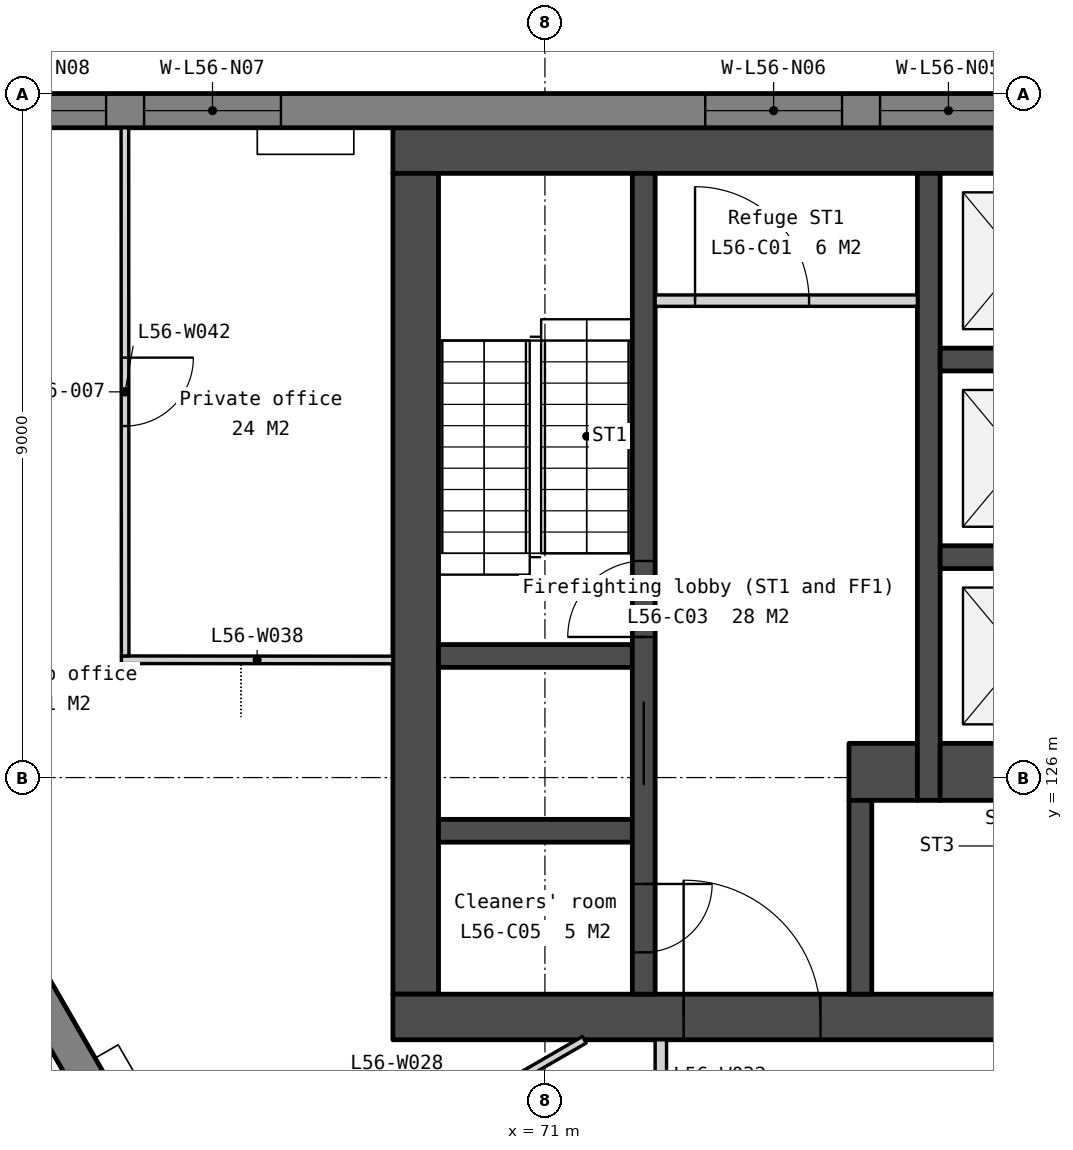
"""IFC4 building model, lengths in metres.
Left out: names, types, materials, properties, quantities, classifications, styles, units other than length and angle.
Written with IfcOpenShell. Run it as: python <this file> out.ifc"""

import sys

from ifc_helpers import new_model, si_unit, direction, frame, frame_2d, origin, place, context, subcontext, project, spatial, polyline, rectangle, outline, extrude, element, fill, save


model = new_model("IFC4")
c1 = context("Model", 3, precision=1e-05, world=origin(), true_north=direction((0.0, 1.0)))
c2 = subcontext(c1, "Body", "Model", "MODEL_VIEW")
j1 = project(units=[si_unit("LENGTHUNIT", "METRE"), si_unit("PLANEANGLEUNIT", "RADIAN")], contexts=[c1])
p1 = place(None, origin())
s1 = spatial("IfcSite", under=j1, at=p1, CompositionType="ELEMENT")
p2 = place(p1, origin())
s2 = spatial("IfcBuilding", under=s1, at=p2, CompositionType="ELEMENT")
p3 = place(p2, frame((0.0, 0.0, 223.1)))
s3 = spatial("IfcBuildingStorey", under=s2, at=p3, CompositionType="ELEMENT", Elevation=223.1)
p4 = place(p3, frame((69.0, 134.25, 0.0), z_axis=(0.0, 0.0, 1.0), x_axis=(1.0, 0.0, 0.0)))
e1 = element("IfcWall", 1, at=p4, inside=s3, PredefinedType="SOLIDWALL", context=c2, shape_type="SweptSolid", body=[
    extrude(rectangle(XDim=22.0, YDim=0.6, at=frame_2d((11.0, 0.0))), origin(), (0.0, 0.0, 1.0), 3.6),
])
p5 = place(p3, frame((69.3, 133.95, 0.0), z_axis=(0.0, 0.0, 1.0), x_axis=(0.0, -1.0, 0.0)))
e2 = element("IfcWall", 2, at=p5, inside=s3, PredefinedType="SOLIDWALL", context=c2, shape_type="SweptSolid", body=[
    extrude(rectangle(XDim=10.8, YDim=0.6, at=frame_2d((5.4, 0.0))), origin(), (0.0, 0.0, 1.0), 3.6),
])
p6 = place(p3, frame((69.0, 122.85, 0.0), z_axis=(0.0, 0.0, 1.0), x_axis=(1.0, 0.0, 0.0)))
e3 = element("IfcWall", 3, at=p6, inside=s3, PredefinedType="SOLIDWALL", context=c2, shape_type="SweptSolid", body=[
    extrude(rectangle(XDim=22.0, YDim=0.6, at=frame_2d((11.0, 0.0))), origin(), (0.0, 0.0, 1.0), 3.6),
])
p7 = place(p6, frame((16.375, 0.0, 0.0)))
e4 = element("IfcOpeningElement", 4, at=p7, cuts=e3, PredefinedType="OPENING", context=c2, shape_type="SweptSolid", body=[
    extrude(rectangle(XDim=1.8, YDim=2.1, at=frame_2d((0.9, 1.05))), frame((0.0, 0.31, 0.0), z_axis=(0.0, -1.0, 0.0), x_axis=(1.0, 0.0, 0.0)), (0.0, 0.0, 1.0), 0.62),
])
p8 = place(p6, frame((3.825, 0.0, 0.0)))
e5 = element("IfcOpeningElement", 5, at=p8, cuts=e3, PredefinedType="OPENING", context=c2, shape_type="SweptSolid", body=[
    extrude(rectangle(XDim=1.8, YDim=2.1, at=frame_2d((0.9, 1.05))), frame((0.0, 0.31, 0.0), z_axis=(0.0, -1.0, 0.0), x_axis=(1.0, 0.0, 0.0)), (0.0, 0.0, 1.0), 0.62),
])
p9 = place(p6, frame((12.85, 0.0, 0.0)))
e6 = element("IfcOpeningElement", 6, at=p9, cuts=e3, PredefinedType="OPENING", context=c2, shape_type="SweptSolid", body=[
    extrude(rectangle(XDim=1.5, YDim=2.1, at=frame_2d((0.75, 1.05))), frame((0.0, 0.31, 0.0), z_axis=(0.0, -1.0, 0.0), x_axis=(1.0, 0.0, 0.0)), (0.0, 0.0, 1.0), 0.62),
])
for number, where, z_axis, x_axis in (
    (7, (69.6, 127.6, 0.0), (0.0, 0.0, 1.0), (1.0, 0.0, 0.0)),
    (8, (69.6, 125.3, 0.0), (0.0, 0.0, 1.0), (1.0, 0.0, 0.0)),
):
    element("IfcWall", number, at=place(p3, frame(where, z_axis=z_axis, x_axis=x_axis)), inside=s3, PredefinedType="SOLIDWALL", context=c2, shape_type="SweptSolid", body=[
        extrude(rectangle(XDim=2.55, YDim=0.3, at=frame_2d((1.275, 0.0))), origin(), (0.0, 0.0, 1.0), 3.6),
    ])
p10 = place(p3, frame((72.3, 133.95, 0.0), z_axis=(0.0, 0.0, 1.0), x_axis=(0.0, -1.0, 0.0)))
e9 = element("IfcWall", 9, at=p10, inside=s3, PredefinedType="SOLIDWALL", context=c2, shape_type="SweptSolid", body=[
    extrude(rectangle(XDim=10.8, YDim=0.3, at=frame_2d((5.4, 0.0))), origin(), (0.0, 0.0, 1.0), 3.6),
])
p11 = place(p10, frame((6.95, 0.0, 0.0)))
e10 = element("IfcOpeningElement", 10, at=p11, cuts=e9, PredefinedType="OPENING", context=c2, shape_type="SweptSolid", body=[
    extrude(rectangle(XDim=1.1, YDim=2.1, at=frame_2d((0.55, 1.05))), frame((0.0, 0.16, 0.0), z_axis=(0.0, -1.0, 0.0), x_axis=(1.0, 0.0, 0.0)), (0.0, 0.0, 1.0), 0.32),
])
p12 = place(p10, frame((9.35, 0.0, 0.0)))
e11 = element("IfcOpeningElement", 11, at=p12, cuts=e9, PredefinedType="OPENING", context=c2, shape_type="SweptSolid", body=[
    extrude(rectangle(XDim=0.9, YDim=2.1, at=frame_2d((0.45, 1.05))), frame((0.0, 0.16, 0.0), z_axis=(0.0, -1.0, 0.0), x_axis=(1.0, 0.0, 0.0)), (0.0, 0.0, 1.0), 0.32),
])
p13 = place(p10, frame((5.1, 0.0, 0.0)))
e12 = element("IfcOpeningElement", 12, at=p13, cuts=e9, PredefinedType="OPENING", context=c2, shape_type="SweptSolid", body=[
    extrude(rectangle(XDim=1.0, YDim=2.1, at=frame_2d((0.5, 1.05))), frame((0.0, 0.16, 0.0), z_axis=(0.0, -1.0, 0.0), x_axis=(1.0, 0.0, 0.0)), (0.0, 0.0, 1.0), 0.32),
])
p14 = place(p3, frame((72.45, 132.275, 0.0), z_axis=(0.0, 0.0, 1.0), x_axis=(1.0, 0.0, 0.0)))
e13 = element("IfcWall", 13, at=p14, inside=s3, PredefinedType="PARTITIONING", context=c2, shape_type="SweptSolid", body=[
    extrude(rectangle(XDim=3.45, YDim=0.15, at=frame_2d((1.725, 0.0))), origin(), (0.0, 0.0, 1.0), 3.6),
])
p15 = place(p14, frame((0.525, 0.0, 0.0)))
e14 = element("IfcOpeningElement", 14, at=p15, cuts=e13, PredefinedType="OPENING", context=c2, shape_type="SweptSolid", body=[
    extrude(rectangle(XDim=1.5, YDim=2.1, at=frame_2d((0.75, 1.05))), frame((0.0, 0.085, 0.0), z_axis=(0.0, -1.0, 0.0), x_axis=(1.0, 0.0, 0.0)), (0.0, 0.0, 1.0), 0.17),
])
p16 = place(p3, frame((75.0, 126.075, 0.0), z_axis=(0.0, 0.0, 1.0), x_axis=(1.0, 0.0, 0.0)))
e15 = element("IfcWall", 15, at=p16, inside=s3, PredefinedType="SOLIDWALL", context=c2, shape_type="SweptSolid", body=[
    extrude(rectangle(XDim=0.9, YDim=0.75, at=frame_2d((0.45, 0.0))), origin(), (0.0, 0.0, 1.0), 3.6),
])
p17 = place(p3, frame((75.15, 125.7, 0.0), z_axis=(0.0, 0.0, 1.0), x_axis=(0.0, -1.0, 0.0)))
e16 = element("IfcWall", 16, at=p17, inside=s3, PredefinedType="SOLIDWALL", context=c2, shape_type="SweptSolid", body=[
    extrude(rectangle(XDim=2.55, YDim=0.3, at=frame_2d((1.275, 0.0))), origin(), (0.0, 0.0, 1.0), 3.6),
])
p18 = place(p3, frame((76.05, 133.95, 0.0), z_axis=(0.0, 0.0, 1.0), x_axis=(0.0, -1.0, 0.0)))
e17 = element("IfcWall", 17, at=p18, inside=s3, PredefinedType="SOLIDWALL", context=c2, shape_type="SweptSolid", body=[
    extrude(rectangle(XDim=8.25, YDim=0.3, at=frame_2d((4.125, 0.0))), origin(), (0.0, 0.0, 1.0), 3.6),
])
for number, where, z_axis, x_axis in (
    (18, (76.2, 131.5, 0.0), (0.0, 0.0, 1.0), (1.0, 0.0, 0.0)),
    (19, (76.2, 128.9, 0.0), (0.0, 0.0, 1.0), (1.0, 0.0, 0.0)),
):
    element("IfcWall", number, at=place(p3, frame(where, z_axis=z_axis, x_axis=x_axis)), inside=s3, PredefinedType="SOLIDWALL", context=c2, shape_type="SweptSolid", body=[
        extrude(rectangle(XDim=2.1, YDim=0.3, at=frame_2d((1.05, 0.0))), origin(), (0.0, 0.0, 1.0), 3.6),
    ])
p19 = place(p3, frame((76.2, 126.075, 0.0), z_axis=(0.0, 0.0, 1.0), x_axis=(1.0, 0.0, 0.0)))
e20 = element("IfcWall", 20, at=p19, inside=s3, PredefinedType="SOLIDWALL", context=c2, shape_type="SweptSolid", body=[
    extrude(rectangle(XDim=2.1, YDim=0.75, at=frame_2d((1.05, 0.0))), origin(), (0.0, 0.0, 1.0), 3.6),
])
p20 = place(p3, frame((99.365, 134.775, -0.15), z_axis=(0.0, 0.0, 1.0), x_axis=(-1.0, 0.0, 0.0)))
e21 = element("IfcWall", 21, at=p20, inside=s3, PredefinedType="SOLIDWALL", context=c2, shape_type="SweptSolid", body=[
    extrude(outline(polyline([(38.729, 0.0), (38.729, 3.75), (0.0, 3.75), (0.0, 0.0), (38.729, 0.0)])), frame((0.0, 0.225, 0.0), z_axis=(0.0, -1.0, 0.0), x_axis=(1.0, 0.0, 0.0)), (0.0, 0.0, 1.0), 0.45),
])
p21 = place(p20, frame((2.791, 0.0, 0.95)))
e22 = element("IfcOpeningElement", 22, at=p21, cuts=e21, PredefinedType="OPENING", context=c2, shape_type="SweptSolid", body=[
    extrude(rectangle(XDim=1.8, YDim=2.2, at=frame_2d((0.9, 1.1))), frame((0.0, 0.235, 0.0), z_axis=(0.0, -1.0, 0.0), x_axis=(1.0, 0.0, 0.0)), (0.0, 0.0, 1.0), 0.47),
])
p22 = place(p20, frame((5.091, 0.0, 0.95)))
e23 = element("IfcOpeningElement", 23, at=p22, cuts=e21, PredefinedType="OPENING", context=c2, shape_type="SweptSolid", body=[
    extrude(rectangle(XDim=1.8, YDim=2.2, at=frame_2d((0.9, 1.1))), frame((0.0, 0.235, 0.0), z_axis=(0.0, -1.0, 0.0), x_axis=(1.0, 0.0, 0.0)), (0.0, 0.0, 1.0), 0.47),
])
p23 = place(p20, frame((12.473, 0.0, 0.95)))
e24 = element("IfcOpeningElement", 24, at=p23, cuts=e21, PredefinedType="OPENING", context=c2, shape_type="SweptSolid", body=[
    extrude(rectangle(XDim=1.8, YDim=2.2, at=frame_2d((0.9, 1.1))), frame((0.0, 0.235, 0.0), z_axis=(0.0, -1.0, 0.0), x_axis=(1.0, 0.0, 0.0)), (0.0, 0.0, 1.0), 0.47),
])
p24 = place(p20, frame((14.773, 0.0, 0.95)))
e25 = element("IfcOpeningElement", 25, at=p24, cuts=e21, PredefinedType="OPENING", context=c2, shape_type="SweptSolid", body=[
    extrude(rectangle(XDim=1.8, YDim=2.2, at=frame_2d((0.9, 1.1))), frame((0.0, 0.235, 0.0), z_axis=(0.0, -1.0, 0.0), x_axis=(1.0, 0.0, 0.0)), (0.0, 0.0, 1.0), 0.47),
])
p25 = place(p20, frame((22.156, 0.0, 0.95)))
e26 = element("IfcOpeningElement", 26, at=p25, cuts=e21, PredefinedType="OPENING", context=c2, shape_type="SweptSolid", body=[
    extrude(rectangle(XDim=1.8, YDim=2.2, at=frame_2d((0.9, 1.1))), frame((0.0, 0.235, 0.0), z_axis=(0.0, -1.0, 0.0), x_axis=(1.0, 0.0, 0.0)), (0.0, 0.0, 1.0), 0.47),
])
p26 = place(p20, frame((24.456, 0.0, 0.95)))
e27 = element("IfcOpeningElement", 27, at=p26, cuts=e21, PredefinedType="OPENING", context=c2, shape_type="SweptSolid", body=[
    extrude(rectangle(XDim=1.8, YDim=2.2, at=frame_2d((0.9, 1.1))), frame((0.0, 0.235, 0.0), z_axis=(0.0, -1.0, 0.0), x_axis=(1.0, 0.0, 0.0)), (0.0, 0.0, 1.0), 0.47),
])
p27 = place(p20, frame((31.838, 0.0, 0.95)))
e28 = element("IfcOpeningElement", 28, at=p27, cuts=e21, PredefinedType="OPENING", context=c2, shape_type="SweptSolid", body=[
    extrude(rectangle(XDim=1.8, YDim=2.2, at=frame_2d((0.9, 1.1))), frame((0.0, 0.235, 0.0), z_axis=(0.0, -1.0, 0.0), x_axis=(1.0, 0.0, 0.0)), (0.0, 0.0, 1.0), 0.47),
])
p28 = place(p20, frame((34.138, 0.0, 0.95)))
e29 = element("IfcOpeningElement", 29, at=p28, cuts=e21, PredefinedType="OPENING", context=c2, shape_type="SweptSolid", body=[
    extrude(rectangle(XDim=1.8, YDim=2.2, at=frame_2d((0.9, 1.1))), frame((0.0, 0.235, 0.0), z_axis=(0.0, -1.0, 0.0), x_axis=(1.0, 0.0, 0.0)), (0.0, 0.0, 1.0), 0.47),
])
p29 = place(p3, frame((59.13, 132.168, -0.15), z_axis=(0.0, 0.0, 1.0), x_axis=(0.500002199942, -0.866024133644, 0.0)))
e30 = element("IfcWall", 30, at=p29, inside=s3, PredefinedType="SOLIDWALL", context=c2, shape_type="SweptSolid", body=[
    extrude(outline(polyline([(38.729, 0.0), (38.729, 3.75), (0.0, 3.75), (0.0, 0.0), (38.729, 0.0)])), frame((0.0, 0.225, 0.0), z_axis=(0.0, -1.0, 0.0), x_axis=(1.0, 0.0, 0.0)), (0.0, 0.0, 1.0), 0.45),
])
p30 = place(p29, frame((2.791, 0.0, 0.95)))
e31 = element("IfcOpeningElement", 31, at=p30, cuts=e30, PredefinedType="OPENING", context=c2, shape_type="SweptSolid", body=[
    extrude(rectangle(XDim=1.8, YDim=2.2, at=frame_2d((0.9, 1.1))), frame((0.0, 0.235, 0.0), z_axis=(0.0, -1.0, 0.0), x_axis=(1.0, 0.0, 0.0)), (0.0, 0.0, 1.0), 0.47),
])
p31 = place(p29, frame((5.091, 0.0, 0.95)))
e32 = element("IfcOpeningElement", 32, at=p31, cuts=e30, PredefinedType="OPENING", context=c2, shape_type="SweptSolid", body=[
    extrude(rectangle(XDim=1.8, YDim=2.2, at=frame_2d((0.9, 1.1))), frame((0.0, 0.235, 0.0), z_axis=(0.0, -1.0, 0.0), x_axis=(1.0, 0.0, 0.0)), (0.0, 0.0, 1.0), 0.47),
])
p32 = place(p29, frame((12.473, 0.0, 0.95)))
e33 = element("IfcOpeningElement", 33, at=p32, cuts=e30, PredefinedType="OPENING", context=c2, shape_type="SweptSolid", body=[
    extrude(rectangle(XDim=1.8, YDim=2.2, at=frame_2d((0.9, 1.1))), frame((0.0, 0.235, 0.0), z_axis=(0.0, -1.0, 0.0), x_axis=(1.0, 0.0, 0.0)), (0.0, 0.0, 1.0), 0.47),
])
p33 = place(p29, frame((14.773, 0.0, 0.95)))
e34 = element("IfcOpeningElement", 34, at=p33, cuts=e30, PredefinedType="OPENING", context=c2, shape_type="SweptSolid", body=[
    extrude(rectangle(XDim=1.8, YDim=2.2, at=frame_2d((0.9, 1.1))), frame((0.0, 0.235, 0.0), z_axis=(0.0, -1.0, 0.0), x_axis=(1.0, 0.0, 0.0)), (0.0, 0.0, 1.0), 0.47),
])
p34 = place(p29, frame((22.156, 0.0, 0.95)))
e35 = element("IfcOpeningElement", 35, at=p34, cuts=e30, PredefinedType="OPENING", context=c2, shape_type="SweptSolid", body=[
    extrude(rectangle(XDim=1.8, YDim=2.2, at=frame_2d((0.9, 1.1))), frame((0.0, 0.235, 0.0), z_axis=(0.0, -1.0, 0.0), x_axis=(1.0, 0.0, 0.0)), (0.0, 0.0, 1.0), 0.47),
])
p35 = place(p29, frame((24.456, 0.0, 0.95)))
e36 = element("IfcOpeningElement", 36, at=p35, cuts=e30, PredefinedType="OPENING", context=c2, shape_type="SweptSolid", body=[
    extrude(rectangle(XDim=1.8, YDim=2.2, at=frame_2d((0.9, 1.1))), frame((0.0, 0.235, 0.0), z_axis=(0.0, -1.0, 0.0), x_axis=(1.0, 0.0, 0.0)), (0.0, 0.0, 1.0), 0.47),
])
p36 = place(p29, frame((31.838, 0.0, 0.95)))
e37 = element("IfcOpeningElement", 37, at=p36, cuts=e30, PredefinedType="OPENING", context=c2, shape_type="SweptSolid", body=[
    extrude(rectangle(XDim=1.8, YDim=2.2, at=frame_2d((0.9, 1.1))), frame((0.0, 0.235, 0.0), z_axis=(0.0, -1.0, 0.0), x_axis=(1.0, 0.0, 0.0)), (0.0, 0.0, 1.0), 0.47),
])
p37 = place(p29, frame((34.138, 0.0, 0.95)))
e38 = element("IfcOpeningElement", 38, at=p37, cuts=e30, PredefinedType="OPENING", context=c2, shape_type="SweptSolid", body=[
    extrude(rectangle(XDim=1.8, YDim=2.2, at=frame_2d((0.9, 1.1))), frame((0.0, 0.235, 0.0), z_axis=(0.0, -1.0, 0.0), x_axis=(1.0, 0.0, 0.0)), (0.0, 0.0, 1.0), 0.47),
])
p38 = place(p3, frame((66.587, 119.703, 0.0), z_axis=(0.0, 0.0, 1.0), x_axis=(0.866023511746, 0.500003277092, 0.0)))
e39 = element("IfcWall", 39, at=p38, inside=s3, PredefinedType="PARTITIONING", context=c2, shape_type="SweptSolid", body=[
    extrude(rectangle(XDim=5.694, YDim=0.1, at=frame_2d((2.847, 0.0))), origin(), (0.0, 0.0, 1.0), 3.6),
])
p39 = place(p38, frame((2.397, 0.0, 0.0)))
e40 = element("IfcOpeningElement", 40, at=p39, cuts=e39, PredefinedType="OPENING", context=c2, shape_type="SweptSolid", body=[
    extrude(rectangle(XDim=0.9, YDim=2.1, at=frame_2d((0.45, 1.05))), frame((0.0, 0.06, 0.0), z_axis=(0.0, -1.0, 0.0), x_axis=(1.0, 0.0, 0.0)), (0.0, 0.0, 1.0), 0.12),
])
p40 = place(p3, frame((72.525, 120.05, 0.0), z_axis=(0.0, 0.0, 1.0), x_axis=(0.0, 1.0, 0.0)))
e41 = element("IfcWall", 41, at=p40, inside=s3, PredefinedType="PARTITIONING", context=c2, shape_type="SweptSolid", body=[
    extrude(rectangle(XDim=2.5, YDim=0.15, at=frame_2d((1.25, 0.0))), origin(), (0.0, 0.0, 1.0), 3.6),
])
p41 = place(p40, frame((0.75, 0.0, 0.0)))
e42 = element("IfcOpeningElement", 42, at=p41, cuts=e41, PredefinedType="OPENING", context=c2, shape_type="SweptSolid", body=[
    extrude(rectangle(XDim=1.0, YDim=2.1, at=frame_2d((0.5, 1.05))), frame((0.0, 0.085, 0.0), z_axis=(0.0, -1.0, 0.0), x_axis=(1.0, 0.0, 0.0)), (0.0, 0.0, 1.0), 0.17),
])
p42 = place(p3, frame((65.427, 127.55, 0.0), z_axis=(0.0, 0.0, 1.0), x_axis=(0.999999663839, -0.000819951894, 0.0)))
e43 = element("IfcWall", 43, at=p42, inside=s3, PredefinedType="PARTITIONING", context=c2, shape_type="SweptSolid", body=[
    extrude(rectangle(XDim=3.573, YDim=0.1, at=frame_2d((1.787, 0.0))), origin(), (0.0, 0.0, 1.0), 3.6),
])
p43 = place(p3, frame((65.474, 134.55, 0.0), z_axis=(0.0, 0.0, 1.0), x_axis=(0.000491814737, -0.999999879059, 0.0)))
e44 = element("IfcWall", 44, at=p43, inside=s3, PredefinedType="PARTITIONING", context=c2, shape_type="SweptSolid", body=[
    extrude(rectangle(XDim=6.95, YDim=0.1, at=frame_2d((3.475, 0.0))), origin(), (0.0, 0.0, 1.0), 3.6),
])
p44 = place(p43, frame((3.025, 0.0, 0.0)))
e45 = element("IfcOpeningElement", 45, at=p44, cuts=e44, PredefinedType="OPENING", context=c2, shape_type="SweptSolid", body=[
    extrude(rectangle(XDim=0.9, YDim=2.1, at=frame_2d((0.45, 1.05))), frame((0.0, 0.06, 0.0), z_axis=(0.0, -1.0, 0.0), x_axis=(1.0, 0.0, 0.0)), (0.0, 0.0, 1.0), 0.12),
])
p45 = place(p11, origin())
e46 = element("IfcDoor", 46, at=p45, inside=s3, OperationType="SLIDING_TO_LEFT", PredefinedType="DOOR", context=c2, shape_type="SweptSolid", body=[
    extrude(rectangle(XDim=1.1, YDim=2.1, at=frame_2d((0.55, 1.05))), frame((0.0, 0.025, 0.0), z_axis=(0.0, -1.0, 0.0), x_axis=(1.0, 0.0, 0.0)), (0.0, 0.0, 1.0), 0.05),
])
fill(e10, e46)
p46 = place(p8, origin())
e47 = element("IfcDoor", 47, at=p46, inside=s3, OperationType="DOUBLE_DOOR_DOUBLE_SWING", PredefinedType="DOOR", context=c2, shape_type="SweptSolid", body=[
    extrude(rectangle(XDim=1.8, YDim=2.1, at=frame_2d((0.9, 1.05))), frame((0.0, 0.025, 0.0), z_axis=(0.0, -1.0, 0.0), x_axis=(1.0, 0.0, 0.0)), (0.0, 0.0, 1.0), 0.05),
])
fill(e5, e47)
p47 = place(p15, origin())
e48 = element("IfcDoor", 48, at=p47, inside=s3, OperationType="DOUBLE_DOOR_DOUBLE_SWING", PredefinedType="DOOR", context=c2, shape_type="SweptSolid", body=[
    extrude(rectangle(XDim=1.5, YDim=2.1, at=frame_2d((0.75, 1.05))), frame((0.0, 0.025, 0.0), z_axis=(0.0, -1.0, 0.0), x_axis=(1.0, 0.0, 0.0)), (0.0, 0.0, 1.0), 0.05),
])
fill(e14, e48)
p48 = place(p12, origin())
e49 = element("IfcDoor", 49, at=p48, inside=s3, OperationType="SINGLE_SWING_LEFT", PredefinedType="DOOR", context=c2, shape_type="SweptSolid", body=[
    extrude(rectangle(XDim=0.9, YDim=2.1, at=frame_2d((0.45, 1.05))), frame((0.0, 0.025, 0.0), z_axis=(0.0, -1.0, 0.0), x_axis=(1.0, 0.0, 0.0)), (0.0, 0.0, 1.0), 0.05),
])
fill(e11, e49)
p49 = place(p13, origin())
e50 = element("IfcDoor", 50, at=p49, inside=s3, OperationType="SINGLE_SWING_RIGHT", PredefinedType="DOOR", context=c2, shape_type="SweptSolid", body=[
    extrude(rectangle(XDim=1.0, YDim=2.1, at=frame_2d((0.5, 1.05))), frame((0.0, 0.025, 0.0), z_axis=(0.0, -1.0, 0.0), x_axis=(1.0, 0.0, 0.0)), (0.0, 0.0, 1.0), 0.05),
])
fill(e12, e50)
p50 = place(p25, origin())
e51 = element("IfcWindow", 51, at=p50, inside=s3, PartitioningType="SINGLE_PANEL", PredefinedType="WINDOW", context=c2, shape_type="SweptSolid", body=[
    extrude(rectangle(XDim=1.8, YDim=2.2, at=frame_2d((0.9, 1.1))), frame((0.0, 0.03, 0.0), z_axis=(0.0, -1.0, 0.0), x_axis=(1.0, 0.0, 0.0)), (0.0, 0.0, 1.0), 0.06),
])
fill(e26, e51)
p51 = place(p26, origin())
e52 = element("IfcWindow", 52, at=p51, inside=s3, PartitioningType="SINGLE_PANEL", PredefinedType="WINDOW", context=c2, shape_type="SweptSolid", body=[
    extrude(rectangle(XDim=1.8, YDim=2.2, at=frame_2d((0.9, 1.1))), frame((0.0, 0.03, 0.0), z_axis=(0.0, -1.0, 0.0), x_axis=(1.0, 0.0, 0.0)), (0.0, 0.0, 1.0), 0.06),
])
fill(e27, e52)
p52 = place(p27, origin())
e53 = element("IfcWindow", 53, at=p52, inside=s3, PartitioningType="SINGLE_PANEL", PredefinedType="WINDOW", context=c2, shape_type="SweptSolid", body=[
    extrude(rectangle(XDim=1.8, YDim=2.2, at=frame_2d((0.9, 1.1))), frame((0.0, 0.03, 0.0), z_axis=(0.0, -1.0, 0.0), x_axis=(1.0, 0.0, 0.0)), (0.0, 0.0, 1.0), 0.06),
])
fill(e28, e53)
p53 = place(p28, origin())
e54 = element("IfcWindow", 54, at=p53, inside=s3, PartitioningType="SINGLE_PANEL", PredefinedType="WINDOW", context=c2, shape_type="SweptSolid", body=[
    extrude(rectangle(XDim=1.8, YDim=2.2, at=frame_2d((0.9, 1.1))), frame((0.0, 0.03, 0.0), z_axis=(0.0, -1.0, 0.0), x_axis=(1.0, 0.0, 0.0)), (0.0, 0.0, 1.0), 0.06),
])
fill(e29, e54)
p54 = place(p44, origin())
e55 = element("IfcDoor", 55, at=p54, inside=s3, OperationType="SINGLE_SWING_LEFT", PredefinedType="DOOR", context=c2, shape_type="SweptSolid", body=[
    extrude(rectangle(XDim=0.9, YDim=2.1, at=frame_2d((0.45, 1.05))), frame((0.0, 0.025, 0.0), z_axis=(0.0, -1.0, 0.0), x_axis=(1.0, 0.0, 0.0)), (0.0, 0.0, 1.0), 0.05),
])
fill(e45, e55)
save(model, sys.argv[1])
